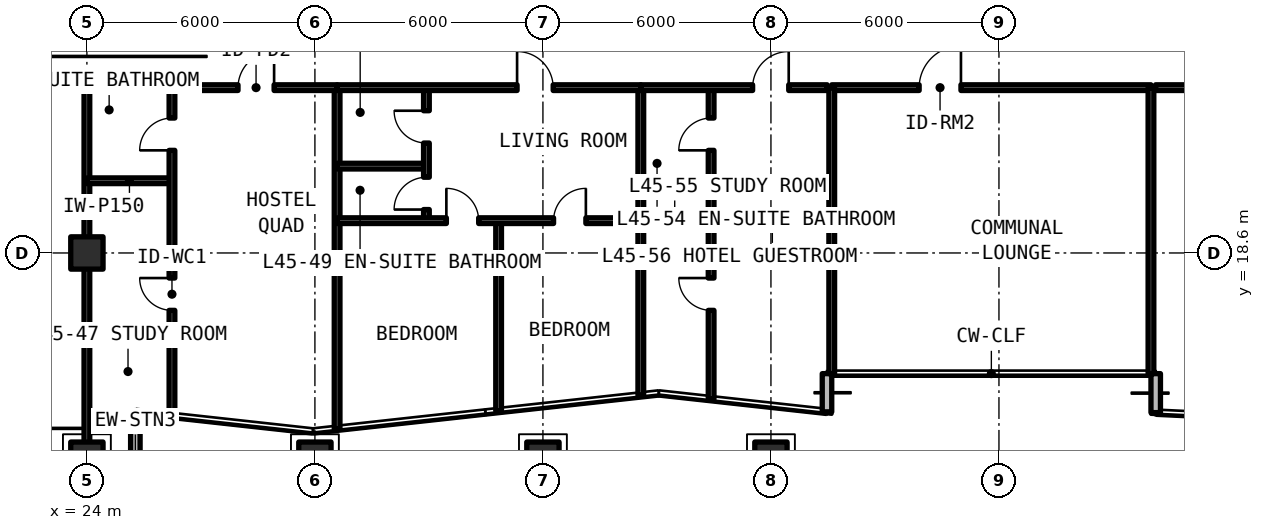
"""IFC4 building model, lengths in metres.
Left out: names, types, materials, properties, quantities, classifications, styles, units other than length and angle.
Written with IfcOpenShell. Run it as: python <this file> out.ifc"""

import sys

from ifc_helpers import new_model, si_unit, direction, frame, frame_2d, origin, origin_2d, place, context, subcontext, project, spatial, rectangle, extrude, element, fill, save


model = new_model("IFC4")
c1 = context("Model", 3, precision=1e-05, world=origin(), true_north=direction((0.0, 1.0)))
c2 = subcontext(c1, "Body", "Model", "MODEL_VIEW")
j1 = project(units=[si_unit("LENGTHUNIT", "METRE"), si_unit("PLANEANGLEUNIT", "RADIAN")], contexts=[c1])
p1 = place(None, origin())
s1 = spatial("IfcSite", under=j1, at=p1, CompositionType="ELEMENT")
p2 = place(p1, origin())
s2 = spatial("IfcBuilding", under=s1, at=p2, CompositionType="ELEMENT")
p3 = place(p2, frame((0.0, 0.0, 162.03)))
s3 = spatial("IfcBuildingStorey", under=s2, at=p3, CompositionType="ELEMENT", Elevation=162.03)
for number, where, z_axis, x_axis in (
    (1, (24.0, 18.6, 0.0), (0.0, 0.0, 1.0), (1.0, 0.0, 0.0)),
    (2, (24.0, 13.2, 0.0), (0.0, 0.0, 1.0), (1.0, 0.0, 0.0)),
    (3, (30.0, 13.2, 0.0), (0.0, 0.0, 1.0), (1.0, 0.0, 0.0)),
    (4, (36.0, 13.2, 0.0), (0.0, 0.0, 1.0), (1.0, 0.0, 0.0)),
    (5, (42.0, 13.2, 0.0), (0.0, 0.0, 1.0), (1.0, 0.0, 0.0)),
):
    element("IfcColumn", number, at=place(p3, frame(where, z_axis=z_axis, x_axis=x_axis)), inside=s3, PredefinedType="COLUMN", context=c2, shape_type="SweptSolid", body=[
        extrude(rectangle(XDim=0.85, YDim=0.85, at=origin_2d()), origin(), (0.0, 0.0, 1.0), 3.63),
    ])
p4 = place(p3, frame((25.275, 12.025, 0.0), z_axis=(0.0, 0.0, 1.0), x_axis=(0.0, 1.0, 0.0)))
e6 = element("IfcWall", 6, at=p4, inside=s3, PredefinedType="SOLIDWALL", context=c2, shape_type="SweptSolid", body=[
    extrude(rectangle(XDim=2.395, YDim=0.25, at=frame_2d((1.197, 0.0))), origin(), (0.0, 0.0, 1.0), 3.41),
])
p5 = place(p3, frame((43.475, 14.419, 0.0), z_axis=(0.0, 0.0, 1.0), x_axis=(0.0, 1.0, 0.0)))
e7 = element("IfcWall", 7, at=p5, inside=s3, PredefinedType="SOLIDWALL", context=c2, shape_type="SweptSolid", body=[
    extrude(rectangle(XDim=1.006, YDim=0.25, at=frame_2d((0.503, 0.0))), origin(), (0.0, 0.0, 1.0), 3.41),
])
p6 = place(p3, frame((52.125, 15.425, 0.0), z_axis=(0.0, 0.0, 1.0), x_axis=(0.0, -1.0, 0.0)))
e8 = element("IfcWall", 8, at=p6, inside=s3, PredefinedType="SOLIDWALL", context=c2, shape_type="SweptSolid", body=[
    extrude(rectangle(XDim=1.026, YDim=0.25, at=frame_2d((0.513, 0.0))), origin(), (0.0, 0.0, 1.0), 3.41),
])
p7 = place(p3, frame((19.725, 16.152, 0.0), z_axis=(0.0, 0.0, 1.0), x_axis=(0.70708586489, -0.707127696864, 0.0)))
e9 = element("IfcWall", 9, at=p7, inside=s3, PredefinedType="SOLIDWALL", context=c2, shape_type="SweptSolid", body=[
    extrude(rectangle(XDim=5.836, YDim=0.25, at=frame_2d((2.918, 0.0))), origin(), (0.0, 0.0, 1.0), 3.41),
])
p8 = place(p7, frame((0.898, 0.0, 0.78)))
e10 = element("IfcOpeningElement", 10, at=p8, cuts=e9, PredefinedType="OPENING", context=c2, shape_type="SweptSolid", body=[
    extrude(rectangle(XDim=3.4, YDim=1.66, at=frame_2d((1.7, 0.83))), frame((0.0, 0.135, 0.0), z_axis=(0.0, -1.0, 0.0), x_axis=(1.0, 0.0, 0.0)), (0.0, 0.0, 1.0), 0.27),
])
p9 = place(p3, frame((43.6, 22.95, 0.0), z_axis=(0.0, 0.0, 1.0), x_axis=(1.0, 0.0, 0.0)))
e11 = element("IfcWall", 11, at=p9, inside=s3, PredefinedType="SOLIDWALL", context=c2, shape_type="SweptSolid", body=[
    extrude(rectangle(XDim=8.4, YDim=0.15, at=frame_2d((4.2, 0.0))), origin(), (0.0, 0.0, 1.0), 2.63),
])
p10 = place(p9, frame((2.3, 0.0, 0.0)))
e12 = element("IfcOpeningElement", 12, at=p10, cuts=e11, PredefinedType="OPENING", context=c2, shape_type="SweptSolid", body=[
    extrude(rectangle(XDim=1.1, YDim=2.15, at=frame_2d((0.55, 1.075))), frame((0.0, 0.085, 0.0), z_axis=(0.0, -1.0, 0.0), x_axis=(1.0, 0.0, 0.0)), (0.0, 0.0, 1.0), 0.17),
])
for number, where, z_axis, x_axis in (
    (13, (43.6, 15.425, 0.0), (0.0, 0.0, 1.0), (0.0, 1.0, 0.0)),
    (14, (52.0, 15.425, 0.0), (0.0, 0.0, 1.0), (0.0, 1.0, 0.0)),
):
    element("IfcWall", number, at=place(p3, frame(where, z_axis=z_axis, x_axis=x_axis)), inside=s3, PredefinedType="SOLIDWALL", context=c2, shape_type="SweptSolid", body=[
        extrude(rectangle(XDim=7.525, YDim=0.15, at=frame_2d((3.762, 0.0))), origin(), (0.0, 0.0, 1.0), 2.63),
    ])
p11 = place(p3, frame((24.0, 12.025, 0.0), z_axis=(0.0, 0.0, 1.0), x_axis=(0.0, 1.0, 0.0)))
e15 = element("IfcWall", 15, at=p11, inside=s3, PredefinedType="SOLIDWALL", context=c2, shape_type="SweptSolid", body=[
    extrude(rectangle(XDim=10.925, YDim=0.15, at=frame_2d((5.462, 0.0))), origin(), (0.0, 0.0, 1.0), 2.63),
])
p12 = place(p3, frame((30.584, 13.976, 0.0), z_axis=(0.0, 0.0, 1.0), x_axis=(0.0, 1.0, 0.0)))
e16 = element("IfcWall", 16, at=p12, inside=s3, PredefinedType="SOLIDWALL", context=c2, shape_type="SweptSolid", body=[
    extrude(rectangle(XDim=8.974, YDim=0.15, at=frame_2d((4.487, 0.0))), origin(), (0.0, 0.0, 1.0), 2.63),
])
p13 = place(p3, frame((24.0, 20.5, 0.0), z_axis=(0.0, 0.0, 1.0), x_axis=(1.0, 0.0, 0.0)))
e17 = element("IfcWall", 17, at=p13, inside=s3, PredefinedType="PARTITIONING", context=c2, shape_type="SweptSolid", body=[
    extrude(rectangle(XDim=2.239, YDim=0.15, at=frame_2d((1.119, 0.0))), origin(), (0.0, 0.0, 1.0), 2.63),
])
p14 = place(p3, frame((26.239, 14.314, 0.0), z_axis=(0.0, 0.0, 1.0), x_axis=(0.0, 1.0, 0.0)))
e18 = element("IfcWall", 18, at=p14, inside=s3, PredefinedType="PARTITIONING", context=c2, shape_type="SweptSolid", body=[
    extrude(rectangle(XDim=8.636, YDim=0.15, at=frame_2d((4.318, 0.0))), origin(), (0.0, 0.0, 1.0), 2.63),
])
p15 = place(p14, frame((2.776, 0.0, 0.0)))
e19 = element("IfcOpeningElement", 19, at=p15, cuts=e18, PredefinedType="OPENING", context=c2, shape_type="SweptSolid", body=[
    extrude(rectangle(XDim=0.85, YDim=2.1, at=frame_2d((0.425, 1.05))), frame((0.0, 0.085, 0.0), z_axis=(0.0, -1.0, 0.0), x_axis=(1.0, 0.0, 0.0)), (0.0, 0.0, 1.0), 0.17),
])
p16 = place(p14, frame((6.986, 0.0, 0.0)))
e20 = element("IfcOpeningElement", 20, at=p16, cuts=e18, PredefinedType="OPENING", context=c2, shape_type="SweptSolid", body=[
    extrude(rectangle(XDim=0.85, YDim=2.1, at=frame_2d((0.425, 1.05))), frame((0.0, 0.085, 0.0), z_axis=(0.0, -1.0, 0.0), x_axis=(1.0, 0.0, 0.0)), (0.0, 0.0, 1.0), 0.17),
])
p17 = place(p3, frame((24.0, 22.95, 0.0), z_axis=(0.0, 0.0, 1.0), x_axis=(1.0, 0.0, 0.0)))
e21 = element("IfcWall", 21, at=p17, inside=s3, PredefinedType="SOLIDWALL", context=c2, shape_type="SweptSolid", body=[
    extrude(rectangle(XDim=6.584, YDim=0.15, at=frame_2d((3.292, 0.0))), origin(), (0.0, 0.0, 1.0), 2.63),
])
p18 = place(p17, frame((3.976, 0.0, 0.0)))
e22 = element("IfcOpeningElement", 22, at=p18, cuts=e21, PredefinedType="OPENING", context=c2, shape_type="SweptSolid", body=[
    extrude(rectangle(XDim=0.95, YDim=2.15, at=frame_2d((0.475, 1.075))), frame((0.0, 0.085, 0.0), z_axis=(0.0, -1.0, 0.0), x_axis=(1.0, 0.0, 0.0)), (0.0, 0.0, 1.0), 0.17),
])
p19 = place(p3, frame((38.576, 14.854, 0.0), z_axis=(0.0, 0.0, 1.0), x_axis=(0.0, 1.0, 0.0)))
e23 = element("IfcWall", 23, at=p19, inside=s3, PredefinedType="SOLIDWALL", context=c2, shape_type="SweptSolid", body=[
    extrude(rectangle(XDim=8.096, YDim=0.15, at=frame_2d((4.048, 0.0))), origin(), (0.0, 0.0, 1.0), 2.63),
])
p20 = place(p3, frame((30.584, 20.885, 0.0), z_axis=(0.0, 0.0, 1.0), x_axis=(1.0, 0.0, 0.0)))
e24 = element("IfcWall", 24, at=p20, inside=s3, PredefinedType="PARTITIONING", context=c2, shape_type="SweptSolid", body=[
    extrude(rectangle(XDim=2.35, YDim=0.15, at=frame_2d((1.175, 0.0))), origin(), (0.0, 0.0, 1.0), 2.63),
])
p21 = place(p3, frame((32.934, 19.45, 0.0), z_axis=(0.0, 0.0, 1.0), x_axis=(0.0, 1.0, 0.0)))
e25 = element("IfcWall", 25, at=p21, inside=s3, PredefinedType="PARTITIONING", context=c2, shape_type="SweptSolid", body=[
    extrude(rectangle(XDim=3.5, YDim=0.15, at=frame_2d((1.75, 0.0))), origin(), (0.0, 0.0, 1.0), 2.63),
])
p22 = place(p21, frame((0.292, 0.0, 0.0)))
e26 = element("IfcOpeningElement", 26, at=p22, cuts=e25, PredefinedType="OPENING", context=c2, shape_type="SweptSolid", body=[
    extrude(rectangle(XDim=0.85, YDim=2.1, at=frame_2d((0.425, 1.05))), frame((0.0, 0.085, 0.0), z_axis=(0.0, -1.0, 0.0), x_axis=(1.0, 0.0, 0.0)), (0.0, 0.0, 1.0), 0.17),
])
p23 = place(p21, frame((2.042, 0.0, 0.0)))
e27 = element("IfcOpeningElement", 27, at=p23, cuts=e25, PredefinedType="OPENING", context=c2, shape_type="SweptSolid", body=[
    extrude(rectangle(XDim=0.85, YDim=2.1, at=frame_2d((0.425, 1.05))), frame((0.0, 0.085, 0.0), z_axis=(0.0, -1.0, 0.0), x_axis=(1.0, 0.0, 0.0)), (0.0, 0.0, 1.0), 0.17),
])
p24 = place(p3, frame((34.834, 14.442, 0.0), z_axis=(0.0, 0.0, 1.0), x_axis=(0.0, 1.0, 0.0)))
e28 = element("IfcWall", 28, at=p24, inside=s3, PredefinedType="PARTITIONING", context=c2, shape_type="SweptSolid", body=[
    extrude(rectangle(XDim=5.008, YDim=0.15, at=frame_2d((2.504, 0.0))), origin(), (0.0, 0.0, 1.0), 2.63),
])
p25 = place(p3, frame((30.584, 19.45, 0.0), z_axis=(0.0, 0.0, 1.0), x_axis=(1.0, 0.0, 0.0)))
e29 = element("IfcWall", 29, at=p25, inside=s3, PredefinedType="PARTITIONING", context=c2, shape_type="SweptSolid", body=[
    extrude(rectangle(XDim=7.992, YDim=0.15, at=frame_2d((3.996, 0.0))), origin(), (0.0, 0.0, 1.0), 2.63),
])
p26 = place(p25, frame((2.875, 0.0, 0.0)))
e30 = element("IfcOpeningElement", 30, at=p26, cuts=e29, PredefinedType="OPENING", context=c2, shape_type="SweptSolid", body=[
    extrude(rectangle(XDim=0.85, YDim=2.1, at=frame_2d((0.425, 1.05))), frame((0.0, 0.085, 0.0), z_axis=(0.0, -1.0, 0.0), x_axis=(1.0, 0.0, 0.0)), (0.0, 0.0, 1.0), 0.17),
])
p27 = place(p25, frame((5.696, 0.0, 0.0)))
e31 = element("IfcOpeningElement", 31, at=p27, cuts=e29, PredefinedType="OPENING", context=c2, shape_type="SweptSolid", body=[
    extrude(rectangle(XDim=0.85, YDim=2.1, at=frame_2d((0.425, 1.05))), frame((0.0, 0.085, 0.0), z_axis=(0.0, -1.0, 0.0), x_axis=(1.0, 0.0, 0.0)), (0.0, 0.0, 1.0), 0.17),
])
p28 = place(p3, frame((30.584, 22.95, 0.0), z_axis=(0.0, 0.0, 1.0), x_axis=(1.0, 0.0, 0.0)))
e32 = element("IfcWall", 32, at=p28, inside=s3, PredefinedType="SOLIDWALL", context=c2, shape_type="SweptSolid", body=[
    extrude(rectangle(XDim=7.992, YDim=0.15, at=frame_2d((3.996, 0.0))), origin(), (0.0, 0.0, 1.0), 2.63),
])
p29 = place(p28, frame((4.736, 0.0, 0.0)))
e33 = element("IfcOpeningElement", 33, at=p29, cuts=e32, PredefinedType="OPENING", context=c2, shape_type="SweptSolid", body=[
    extrude(rectangle(XDim=0.95, YDim=2.15, at=frame_2d((0.475, 1.075))), frame((0.0, 0.085, 0.0), z_axis=(0.0, -1.0, 0.0), x_axis=(1.0, 0.0, 0.0)), (0.0, 0.0, 1.0), 0.17),
])
p30 = place(p3, frame((38.576, 20.5, 0.0), z_axis=(0.0, 0.0, 1.0), x_axis=(1.0, 0.0, 0.0)))
e34 = element("IfcWall", 34, at=p30, inside=s3, PredefinedType="PARTITIONING", context=c2, shape_type="SweptSolid", body=[
    extrude(rectangle(XDim=1.85, YDim=0.15, at=frame_2d((0.925, 0.0))), origin(), (0.0, 0.0, 1.0), 2.63),
])
p31 = place(p3, frame((40.426, 14.755, 0.0), z_axis=(0.0, 0.0, 1.0), x_axis=(0.0, 1.0, 0.0)))
e35 = element("IfcWall", 35, at=p31, inside=s3, PredefinedType="PARTITIONING", context=c2, shape_type="SweptSolid", body=[
    extrude(rectangle(XDim=8.195, YDim=0.15, at=frame_2d((4.098, 0.0))), origin(), (0.0, 0.0, 1.0), 2.63),
])
p32 = place(p31, frame((2.335, 0.0, 0.0)))
e36 = element("IfcOpeningElement", 36, at=p32, cuts=e35, PredefinedType="OPENING", context=c2, shape_type="SweptSolid", body=[
    extrude(rectangle(XDim=0.85, YDim=2.1, at=frame_2d((0.425, 1.05))), frame((0.0, 0.085, 0.0), z_axis=(0.0, -1.0, 0.0), x_axis=(1.0, 0.0, 0.0)), (0.0, 0.0, 1.0), 0.17),
])
p33 = place(p31, frame((6.545, 0.0, 0.0)))
e37 = element("IfcOpeningElement", 37, at=p33, cuts=e35, PredefinedType="OPENING", context=c2, shape_type="SweptSolid", body=[
    extrude(rectangle(XDim=0.85, YDim=2.1, at=frame_2d((0.425, 1.05))), frame((0.0, 0.085, 0.0), z_axis=(0.0, -1.0, 0.0), x_axis=(1.0, 0.0, 0.0)), (0.0, 0.0, 1.0), 0.17),
])
p34 = place(p3, frame((38.576, 22.95, 0.0), z_axis=(0.0, 0.0, 1.0), x_axis=(1.0, 0.0, 0.0)))
e38 = element("IfcWall", 38, at=p34, inside=s3, PredefinedType="SOLIDWALL", context=c2, shape_type="SweptSolid", body=[
    extrude(rectangle(XDim=4.904, YDim=0.15, at=frame_2d((2.452, 0.0))), origin(), (0.0, 0.0, 1.0), 2.63),
])
p35 = place(p34, frame((2.942, 0.0, 0.0)))
e39 = element("IfcOpeningElement", 39, at=p35, cuts=e38, PredefinedType="OPENING", context=c2, shape_type="SweptSolid", body=[
    extrude(rectangle(XDim=0.95, YDim=2.15, at=frame_2d((0.475, 1.075))), frame((0.0, 0.085, 0.0), z_axis=(0.0, -1.0, 0.0), x_axis=(1.0, 0.0, 0.0)), (0.0, 0.0, 1.0), 0.17),
])
p36 = place(p3, frame((52.12, 22.95, 0.0), z_axis=(0.0, 0.0, 1.0), x_axis=(1.0, 0.0, 0.0)))
e40 = element("IfcWall", 40, at=p36, inside=s3, PredefinedType="SOLIDWALL", context=c2, shape_type="SweptSolid", body=[
    extrude(rectangle(XDim=6.646, YDim=0.15, at=frame_2d((3.323, 0.0))), origin(), (0.0, 0.0, 1.0), 2.63),
])
p37 = place(p36, frame((2.848, 0.0, 0.0)))
e41 = element("IfcOpeningElement", 41, at=p37, cuts=e40, PredefinedType="OPENING", context=c2, shape_type="SweptSolid", body=[
    extrude(rectangle(XDim=0.95, YDim=2.15, at=frame_2d((0.475, 1.075))), frame((0.0, 0.085, 0.0), z_axis=(0.0, -1.0, 0.0), x_axis=(1.0, 0.0, 0.0)), (0.0, 0.0, 1.0), 0.17),
])
p38 = place(p10, origin())
e42 = element("IfcDoor", 42, at=p38, inside=s3, OperationType="SINGLE_SWING_RIGHT", PredefinedType="DOOR", context=c2, shape_type="SweptSolid", body=[
    extrude(rectangle(XDim=1.1, YDim=2.15, at=frame_2d((0.55, 1.075))), frame((0.0, 0.025, 0.0), z_axis=(0.0, -1.0, 0.0), x_axis=(1.0, 0.0, 0.0)), (0.0, 0.0, 1.0), 0.05),
])
fill(e12, e42)
p39 = place(p15, origin())
e43 = element("IfcDoor", 43, at=p39, inside=s3, OperationType="SINGLE_SWING_RIGHT", PredefinedType="DOOR", context=c2, shape_type="SweptSolid", body=[
    extrude(rectangle(XDim=0.85, YDim=2.1, at=frame_2d((0.425, 1.05))), frame((0.0, 0.025, 0.0), z_axis=(0.0, -1.0, 0.0), x_axis=(1.0, 0.0, 0.0)), (0.0, 0.0, 1.0), 0.05),
])
fill(e19, e43)
p40 = place(p16, origin())
e44 = element("IfcDoor", 44, at=p40, inside=s3, OperationType="SINGLE_SWING_LEFT", PredefinedType="DOOR", context=c2, shape_type="SweptSolid", body=[
    extrude(rectangle(XDim=0.85, YDim=2.1, at=frame_2d((0.425, 1.05))), frame((0.0, 0.025, 0.0), z_axis=(0.0, -1.0, 0.0), x_axis=(1.0, 0.0, 0.0)), (0.0, 0.0, 1.0), 0.05),
])
fill(e20, e44)
p41 = place(p18, origin())
e45 = element("IfcDoor", 45, at=p41, inside=s3, OperationType="SINGLE_SWING_RIGHT", PredefinedType="DOOR", context=c2, shape_type="SweptSolid", body=[
    extrude(rectangle(XDim=0.95, YDim=2.15, at=frame_2d((0.475, 1.075))), frame((0.0, 0.025, 0.0), z_axis=(0.0, -1.0, 0.0), x_axis=(1.0, 0.0, 0.0)), (0.0, 0.0, 1.0), 0.05),
])
fill(e22, e45)
p42 = place(p22, origin())
e46 = element("IfcDoor", 46, at=p42, inside=s3, OperationType="SINGLE_SWING_LEFT", PredefinedType="DOOR", context=c2, shape_type="SweptSolid", body=[
    extrude(rectangle(XDim=0.85, YDim=2.1, at=frame_2d((0.425, 1.05))), frame((0.0, 0.025, 0.0), z_axis=(0.0, -1.0, 0.0), x_axis=(1.0, 0.0, 0.0)), (0.0, 0.0, 1.0), 0.05),
])
fill(e26, e46)
p43 = place(p23, origin())
e47 = element("IfcDoor", 47, at=p43, inside=s3, OperationType="SINGLE_SWING_RIGHT", PredefinedType="DOOR", context=c2, shape_type="SweptSolid", body=[
    extrude(rectangle(XDim=0.85, YDim=2.1, at=frame_2d((0.425, 1.05))), frame((0.0, 0.025, 0.0), z_axis=(0.0, -1.0, 0.0), x_axis=(1.0, 0.0, 0.0)), (0.0, 0.0, 1.0), 0.05),
])
fill(e27, e47)
p44 = place(p26, origin())
e48 = element("IfcDoor", 48, at=p44, inside=s3, OperationType="SINGLE_SWING_LEFT", PredefinedType="DOOR", context=c2, shape_type="SweptSolid", body=[
    extrude(rectangle(XDim=0.85, YDim=2.1, at=frame_2d((0.425, 1.05))), frame((0.0, 0.025, 0.0), z_axis=(0.0, -1.0, 0.0), x_axis=(1.0, 0.0, 0.0)), (0.0, 0.0, 1.0), 0.05),
])
fill(e30, e48)
p45 = place(p27, origin())
e49 = element("IfcDoor", 49, at=p45, inside=s3, OperationType="SINGLE_SWING_RIGHT", PredefinedType="DOOR", context=c2, shape_type="SweptSolid", body=[
    extrude(rectangle(XDim=0.85, YDim=2.1, at=frame_2d((0.425, 1.05))), frame((0.0, 0.025, 0.0), z_axis=(0.0, -1.0, 0.0), x_axis=(1.0, 0.0, 0.0)), (0.0, 0.0, 1.0), 0.05),
])
fill(e31, e49)
p46 = place(p29, origin())
e50 = element("IfcDoor", 50, at=p46, inside=s3, OperationType="SINGLE_SWING_LEFT", PredefinedType="DOOR", context=c2, shape_type="SweptSolid", body=[
    extrude(rectangle(XDim=0.95, YDim=2.15, at=frame_2d((0.475, 1.075))), frame((0.0, 0.025, 0.0), z_axis=(0.0, -1.0, 0.0), x_axis=(1.0, 0.0, 0.0)), (0.0, 0.0, 1.0), 0.05),
])
fill(e33, e50)
p47 = place(p32, origin())
e51 = element("IfcDoor", 51, at=p47, inside=s3, OperationType="SINGLE_SWING_RIGHT", PredefinedType="DOOR", context=c2, shape_type="SweptSolid", body=[
    extrude(rectangle(XDim=0.85, YDim=2.1, at=frame_2d((0.425, 1.05))), frame((0.0, 0.025, 0.0), z_axis=(0.0, -1.0, 0.0), x_axis=(1.0, 0.0, 0.0)), (0.0, 0.0, 1.0), 0.05),
])
fill(e36, e51)
p48 = place(p33, origin())
e52 = element("IfcDoor", 52, at=p48, inside=s3, OperationType="SINGLE_SWING_LEFT", PredefinedType="DOOR", context=c2, shape_type="SweptSolid", body=[
    extrude(rectangle(XDim=0.85, YDim=2.1, at=frame_2d((0.425, 1.05))), frame((0.0, 0.025, 0.0), z_axis=(0.0, -1.0, 0.0), x_axis=(1.0, 0.0, 0.0)), (0.0, 0.0, 1.0), 0.05),
])
fill(e37, e52)
p49 = place(p35, origin())
e53 = element("IfcDoor", 53, at=p49, inside=s3, OperationType="SINGLE_SWING_RIGHT", PredefinedType="DOOR", context=c2, shape_type="SweptSolid", body=[
    extrude(rectangle(XDim=0.95, YDim=2.15, at=frame_2d((0.475, 1.075))), frame((0.0, 0.025, 0.0), z_axis=(0.0, -1.0, 0.0), x_axis=(1.0, 0.0, 0.0)), (0.0, 0.0, 1.0), 0.05),
])
fill(e39, e53)
save(model, sys.argv[1])
